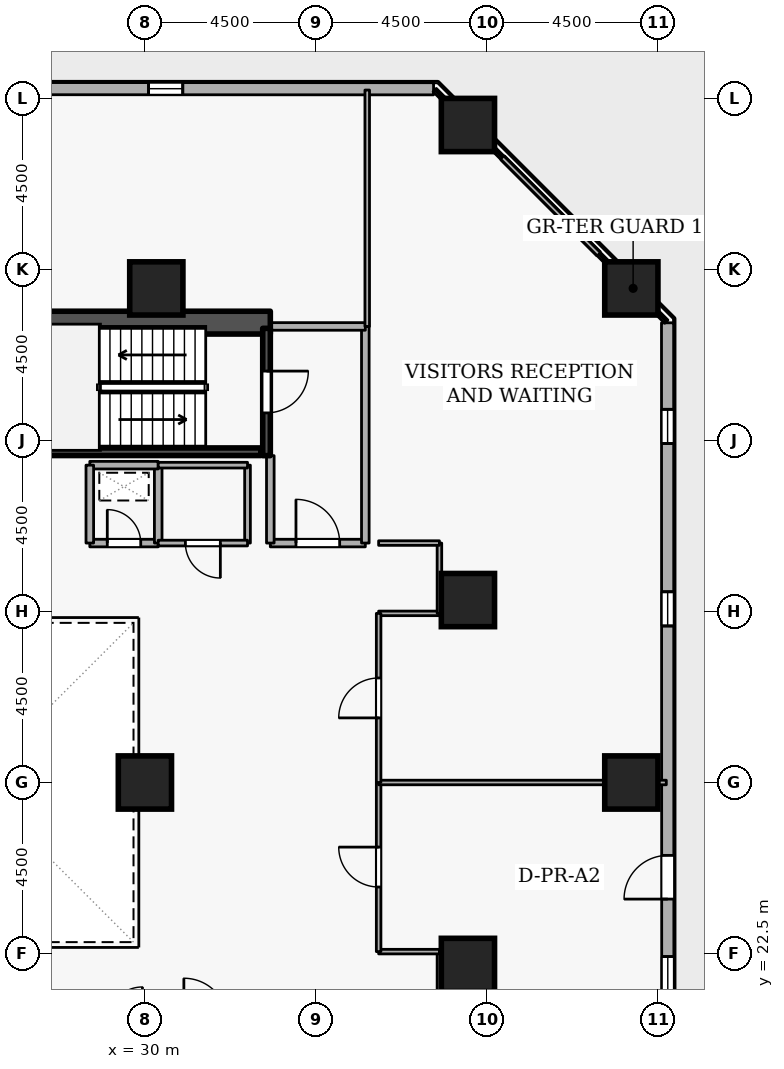
"""IFC4 building model, lengths in metres.
Left out: names, types, materials, properties, quantities, classifications, styles, units other than length and angle.
Written with IfcOpenShell. Run it as: python <this file> out.ifc"""

import sys

from ifc_helpers import new_model, si_unit, direction, frame, frame_2d, origin, origin_2d, place, context, subcontext, project, spatial, rectangle, extrude, element, fill, save


model = new_model("IFC4")
c1 = context("Model", 3, precision=1e-05, world=origin(), true_north=direction((0.0, 1.0)))
c2 = subcontext(c1, "Body", "Model", "MODEL_VIEW")
j1 = project(units=[si_unit("LENGTHUNIT", "METRE"), si_unit("PLANEANGLEUNIT", "RADIAN")], contexts=[c1])
p1 = place(None, origin())
s1 = spatial("IfcSite", under=j1, at=p1, CompositionType="ELEMENT")
p2 = place(p1, origin())
s2 = spatial("IfcBuilding", under=s1, at=p2, CompositionType="ELEMENT")
p3 = place(p2, frame((0.0, 0.0, 27.9)))
s3 = spatial("IfcBuildingStorey", under=s2, at=p3, CompositionType="ELEMENT", Elevation=27.9)
p4 = place(p3, frame((17.7, 39.1, 0.0), z_axis=(0.0, 0.0, 1.0), x_axis=(1.0, 0.0, 0.0)))
e1 = element("IfcWall", 1, at=p4, inside=s3, PredefinedType="SHEAR", context=c2, shape_type="SweptSolid", body=[
    extrude(rectangle(XDim=15.6, YDim=0.6, at=frame_2d((7.8, 0.0))), origin(), (0.0, 0.0, 1.0), 3.6),
])
for number, where, z_axis, x_axis in (
    (2, (42.8, 27.0, 0.0), (0.0, 0.0, 1.0), (1.0, 0.0, 0.0)),
    (3, (42.8, 40.0, 0.0), (0.0, 0.0, 1.0), (1.0, 0.0, 0.0)),
    (4, (38.5, 44.3, 0.0), (0.0, 0.0, 1.0), (1.0, 0.0, 0.0)),
    (5, (38.5, 22.2, 0.0), (0.0, 0.0, 1.0), (1.0, 0.0, 0.0)),
    (6, (38.5, 31.8, 0.0), (0.0, 0.0, 1.0), (1.0, 0.0, 0.0)),
    (7, (30.3, 40.0, 0.0), (0.0, 0.0, 1.0), (1.0, 0.0, 0.0)),
    (8, (30.0, 27.0, 0.0), (0.0, 0.0, 1.0), (1.0, 0.0, 0.0)),
):
    element("IfcColumn", number, at=place(p3, frame(where, z_axis=z_axis, x_axis=x_axis)), inside=s3, PredefinedType="COLUMN", context=c2, shape_type="SweptSolid", body=[
        extrude(rectangle(XDim=1.4, YDim=1.4, at=origin_2d()), origin(), (0.0, 0.0, 1.0), 3.6),
    ])
p5 = place(p3, frame((43.765, 5.319, 0.0), z_axis=(0.0, 0.0, 1.0), x_axis=(-0.000339718087, 0.999999942296, 0.0)))
e9 = element("IfcWall", 9, at=p5, inside=s3, PredefinedType="STANDARD", context=c2, shape_type="SweptSolid", body=[
    extrude(rectangle(XDim=33.777, YDim=0.32, at=frame_2d((16.888, 0.0))), origin(), (0.0, 0.0, 1.0), 2.7),
])
p6 = place(p5, frame((18.614, 0.0, 0.0)))
e10 = element("IfcOpeningElement", 10, at=p6, cuts=e9, PredefinedType="OPENING", context=c2, shape_type="SweptSolid", body=[
    extrude(rectangle(XDim=1.15, YDim=2.1, at=frame_2d((0.575, 1.05))), frame((0.0, 0.17, 0.0), z_axis=(0.0, -1.0, 0.0), x_axis=(1.0, 0.0, 0.0)), (0.0, 0.0, 1.0), 0.34),
])
p7 = place(p5, frame((1.8, 0.0, 0.72)))
e11 = element("IfcOpeningElement", 11, at=p7, cuts=e9, PredefinedType="OPENING", context=c2, shape_type="SweptSolid", body=[
    extrude(rectangle(XDim=0.9, YDim=1.75, at=frame_2d((0.45, 0.875))), frame((0.0, 0.17, 0.0), z_axis=(0.0, -1.0, 0.0), x_axis=(1.0, 0.0, 0.0)), (0.0, 0.0, 1.0), 0.34),
])
p8 = place(p5, frame((6.6, 0.0, 0.72)))
e12 = element("IfcOpeningElement", 12, at=p8, cuts=e9, PredefinedType="OPENING", context=c2, shape_type="SweptSolid", body=[
    extrude(rectangle(XDim=0.9, YDim=1.75, at=frame_2d((0.45, 0.875))), frame((0.0, 0.17, 0.0), z_axis=(0.0, -1.0, 0.0), x_axis=(1.0, 0.0, 0.0)), (0.0, 0.0, 1.0), 0.34),
])
p9 = place(p5, frame((11.4, 0.0, 0.72)))
e13 = element("IfcOpeningElement", 13, at=p9, cuts=e9, PredefinedType="OPENING", context=c2, shape_type="SweptSolid", body=[
    extrude(rectangle(XDim=0.9, YDim=1.75, at=frame_2d((0.45, 0.875))), frame((0.0, 0.17, 0.0), z_axis=(0.0, -1.0, 0.0), x_axis=(1.0, 0.0, 0.0)), (0.0, 0.0, 1.0), 0.34),
])
p10 = place(p5, frame((16.2, 0.0, 0.72)))
e14 = element("IfcOpeningElement", 14, at=p10, cuts=e9, PredefinedType="OPENING", context=c2, shape_type="SweptSolid", body=[
    extrude(rectangle(XDim=0.9, YDim=1.75, at=frame_2d((0.45, 0.875))), frame((0.0, 0.17, 0.0), z_axis=(0.0, -1.0, 0.0), x_axis=(1.0, 0.0, 0.0)), (0.0, 0.0, 1.0), 0.34),
])
p11 = place(p5, frame((25.8, 0.0, 0.72)))
e15 = element("IfcOpeningElement", 15, at=p11, cuts=e9, PredefinedType="OPENING", context=c2, shape_type="SweptSolid", body=[
    extrude(rectangle(XDim=0.9, YDim=1.75, at=frame_2d((0.45, 0.875))), frame((0.0, 0.17, 0.0), z_axis=(0.0, -1.0, 0.0), x_axis=(1.0, 0.0, 0.0)), (0.0, 0.0, 1.0), 0.34),
])
p12 = place(p5, frame((30.6, 0.0, 0.72)))
e16 = element("IfcOpeningElement", 16, at=p12, cuts=e9, PredefinedType="OPENING", context=c2, shape_type="SweptSolid", body=[
    extrude(rectangle(XDim=0.9, YDim=1.75, at=frame_2d((0.45, 0.875))), frame((0.0, 0.17, 0.0), z_axis=(0.0, -1.0, 0.0), x_axis=(1.0, 0.0, 0.0)), (0.0, 0.0, 1.0), 0.34),
])
p13 = place(p3, frame((37.596, 45.253, 0.0), z_axis=(0.0, 0.0, 1.0), x_axis=(-0.999999942296, 0.000339718087, 0.0)))
e17 = element("IfcWall", 17, at=p13, inside=s3, PredefinedType="STANDARD", context=c2, shape_type="SweptSolid", body=[
    extrude(rectangle(XDim=33.777, YDim=0.32, at=frame_2d((16.888, 0.0))), origin(), (0.0, 0.0, 1.0), 2.7),
])
p14 = place(p13, frame((27.164, 0.0, 0.0)))
e18 = element("IfcOpeningElement", 18, at=p14, cuts=e17, PredefinedType="OPENING", context=c2, shape_type="SweptSolid", body=[
    extrude(rectangle(XDim=1.15, YDim=2.1, at=frame_2d((0.575, 1.05))), frame((0.0, 0.17, 0.0), z_axis=(0.0, -1.0, 0.0), x_axis=(1.0, 0.0, 0.0)), (0.0, 0.0, 1.0), 0.34),
])
p15 = place(p13, frame((6.6, 0.0, 0.72)))
e19 = element("IfcOpeningElement", 19, at=p15, cuts=e17, PredefinedType="OPENING", context=c2, shape_type="SweptSolid", body=[
    extrude(rectangle(XDim=0.9, YDim=1.75, at=frame_2d((0.45, 0.875))), frame((0.0, 0.17, 0.0), z_axis=(0.0, -1.0, 0.0), x_axis=(1.0, 0.0, 0.0)), (0.0, 0.0, 1.0), 0.34),
])
p16 = place(p13, frame((16.2, 0.0, 0.72)))
e20 = element("IfcOpeningElement", 20, at=p16, cuts=e17, PredefinedType="OPENING", context=c2, shape_type="SweptSolid", body=[
    extrude(rectangle(XDim=0.9, YDim=1.75, at=frame_2d((0.45, 0.875))), frame((0.0, 0.17, 0.0), z_axis=(0.0, -1.0, 0.0), x_axis=(1.0, 0.0, 0.0)), (0.0, 0.0, 1.0), 0.34),
])
p17 = place(p13, frame((21.0, 0.0, 0.72)))
e21 = element("IfcOpeningElement", 21, at=p17, cuts=e17, PredefinedType="OPENING", context=c2, shape_type="SweptSolid", body=[
    extrude(rectangle(XDim=0.9, YDim=1.75, at=frame_2d((0.45, 0.875))), frame((0.0, 0.17, 0.0), z_axis=(0.0, -1.0, 0.0), x_axis=(1.0, 0.0, 0.0)), (0.0, 0.0, 1.0), 0.34),
])
p18 = place(p13, frame((30.6, 0.0, 0.72)))
e22 = element("IfcOpeningElement", 22, at=p18, cuts=e17, PredefinedType="OPENING", context=c2, shape_type="SweptSolid", body=[
    extrude(rectangle(XDim=0.9, YDim=1.75, at=frame_2d((0.45, 0.875))), frame((0.0, 0.17, 0.0), z_axis=(0.0, -1.0, 0.0), x_axis=(1.0, 0.0, 0.0)), (0.0, 0.0, 1.0), 0.34),
])
p19 = place(p3, frame((33.2, 38.95, 0.0), z_axis=(0.0, 0.0, 1.0), x_axis=(0.0, -1.0, 0.0)))
e23 = element("IfcWall", 23, at=p19, inside=s3, PredefinedType="SHEAR", context=c2, shape_type="SweptSolid", body=[
    extrude(rectangle(XDim=3.35, YDim=0.2, at=frame_2d((1.675, 0.0))), origin(), (0.0, 0.0, 1.0), 3.6),
])
p20 = place(p19, frame((1.125, 0.0, 0.0)))
e24 = element("IfcOpeningElement", 24, at=p20, cuts=e23, PredefinedType="OPENING", context=c2, shape_type="SweptSolid", body=[
    extrude(rectangle(XDim=1.1, YDim=2.1, at=frame_2d((0.55, 1.05))), frame((0.0, 0.11, 0.0), z_axis=(0.0, -1.0, 0.0), x_axis=(1.0, 0.0, 0.0)), (0.0, 0.0, 1.0), 0.22),
])
p21 = place(p3, frame((25.95, 35.703, 0.0), z_axis=(0.0, 0.0, 1.0), x_axis=(1.0, 0.0, 0.0)))
e25 = element("IfcWall", 25, at=p21, inside=s3, PredefinedType="SHEAR", context=c2, shape_type="SweptSolid", body=[
    extrude(rectangle(XDim=7.1, YDim=0.2, at=frame_2d((3.55, 0.0))), origin(), (0.0, 0.0, 1.0), 3.6),
])
p22 = place(p3, frame((33.3, 33.3, 0.0), z_axis=(0.0, 0.0, 1.0), x_axis=(1.0, 0.0, 0.0)))
e26 = element("IfcWall", 26, at=p22, inside=s3, PredefinedType="STANDARD", context=c2, shape_type="SweptSolid", body=[
    extrude(rectangle(XDim=2.5, YDim=0.2, at=frame_2d((1.25, 0.0))), origin(), (0.0, 0.0, 1.0), 3.34),
])
p23 = place(p22, frame((0.675, 0.0, 0.0)))
e27 = element("IfcOpeningElement", 27, at=p23, cuts=e26, PredefinedType="OPENING", context=c2, shape_type="SweptSolid", body=[
    extrude(rectangle(XDim=1.15, YDim=2.1, at=frame_2d((0.575, 1.05))), frame((0.0, 0.11, 0.0), z_axis=(0.0, -1.0, 0.0), x_axis=(1.0, 0.0, 0.0)), (0.0, 0.0, 1.0), 0.22),
])
p24 = place(p3, frame((35.8, 33.3, 0.0), z_axis=(0.0, 0.0, 1.0), x_axis=(0.0, 1.0, 0.0)))
e28 = element("IfcWall", 28, at=p24, inside=s3, PredefinedType="STANDARD", context=c2, shape_type="SweptSolid", body=[
    extrude(rectangle(XDim=5.7, YDim=0.2, at=frame_2d((2.85, 0.0))), origin(), (0.0, 0.0, 1.0), 3.34),
])
p25 = place(p3, frame((35.8, 39.0, 0.0), z_axis=(0.0, 0.0, 1.0), x_axis=(-1.0, 0.0, 0.0)))
e29 = element("IfcWall", 29, at=p25, inside=s3, PredefinedType="STANDARD", context=c2, shape_type="SweptSolid", body=[
    extrude(rectangle(XDim=2.5, YDim=0.2, at=frame_2d((1.25, 0.0))), origin(), (0.0, 0.0, 1.0), 3.34),
])
p26 = place(p3, frame((33.3, 35.6, 0.0), z_axis=(0.0, 0.0, 1.0), x_axis=(0.0, -1.0, 0.0)))
e30 = element("IfcWall", 30, at=p26, inside=s3, PredefinedType="STANDARD", context=c2, shape_type="SweptSolid", body=[
    extrude(rectangle(XDim=2.3, YDim=0.2, at=frame_2d((1.15, 0.0))), origin(), (0.0, 0.0, 1.0), 2.545),
])
p27 = place(p3, frame((28.55, 33.3, 0.0), z_axis=(0.0, 0.0, 1.0), x_axis=(1.0, 0.0, 0.0)))
e31 = element("IfcWall", 31, at=p27, inside=s3, PredefinedType="STANDARD", context=c2, shape_type="SweptSolid", body=[
    extrude(rectangle(XDim=1.8, YDim=0.2, at=frame_2d((0.9, 0.0))), origin(), (0.0, 0.0, 1.0), 3.34),
])
p28 = place(p27, frame((0.46, 0.0, 0.0)))
e32 = element("IfcOpeningElement", 32, at=p28, cuts=e31, PredefinedType="OPENING", context=c2, shape_type="SweptSolid", body=[
    extrude(rectangle(XDim=0.88, YDim=2.04, at=frame_2d((0.44, 1.02))), frame((0.0, 0.11, 0.0), z_axis=(0.0, -1.0, 0.0), x_axis=(1.0, 0.0, 0.0)), (0.0, 0.0, 1.0), 0.22),
])
p29 = place(p3, frame((30.35, 33.3, 0.0), z_axis=(0.0, 0.0, 1.0), x_axis=(0.0, 1.0, 0.0)))
e33 = element("IfcWall", 33, at=p29, inside=s3, PredefinedType="STANDARD", context=c2, shape_type="SweptSolid", body=[
    extrude(rectangle(XDim=2.05, YDim=0.2, at=frame_2d((1.025, 0.0))), origin(), (0.0, 0.0, 1.0), 3.34),
])
p30 = place(p3, frame((30.35, 35.35, 0.0), z_axis=(0.0, 0.0, 1.0), x_axis=(-1.0, 0.0, 0.0)))
e34 = element("IfcWall", 34, at=p30, inside=s3, PredefinedType="STANDARD", context=c2, shape_type="SweptSolid", body=[
    extrude(rectangle(XDim=1.8, YDim=0.2, at=frame_2d((0.9, 0.0))), origin(), (0.0, 0.0, 1.0), 3.34),
])
p31 = place(p3, frame((28.55, 35.35, 0.0), z_axis=(0.0, 0.0, 1.0), x_axis=(0.0, -1.0, 0.0)))
e35 = element("IfcWall", 35, at=p31, inside=s3, PredefinedType="STANDARD", context=c2, shape_type="SweptSolid", body=[
    extrude(rectangle(XDim=2.05, YDim=0.2, at=frame_2d((1.025, 0.0))), origin(), (0.0, 0.0, 1.0), 3.34),
])
p32 = place(p3, frame((32.7, 35.35, 0.0), z_axis=(0.0, 0.0, 1.0), x_axis=(0.0, -1.0, 0.0)))
e36 = element("IfcWall", 36, at=p32, inside=s3, PredefinedType="PARTITIONING", context=c2, shape_type="SweptSolid", body=[
    extrude(rectangle(XDim=2.05, YDim=0.15, at=frame_2d((1.025, 0.0))), origin(), (0.0, 0.0, 1.0), 2.545),
])
p33 = place(p3, frame((32.7, 33.3, 0.0), z_axis=(0.0, 0.0, 1.0), x_axis=(-1.0, 0.0, 0.0)))
e37 = element("IfcWall", 37, at=p33, inside=s3, PredefinedType="PARTITIONING", context=c2, shape_type="SweptSolid", body=[
    extrude(rectangle(XDim=2.35, YDim=0.15, at=frame_2d((1.175, 0.0))), origin(), (0.0, 0.0, 1.0), 3.34),
])
p34 = place(p33, frame((0.715, 0.0, 0.0)))
e38 = element("IfcOpeningElement", 38, at=p34, cuts=e37, PredefinedType="OPENING", context=c2, shape_type="SweptSolid", body=[
    extrude(rectangle(XDim=0.92, YDim=2.08, at=frame_2d((0.46, 1.04))), frame((0.0, 0.085, 0.0), z_axis=(0.0, -1.0, 0.0), x_axis=(1.0, 0.0, 0.0)), (0.0, 0.0, 1.0), 0.17),
])
p35 = place(p3, frame((30.35, 35.35, 0.0), z_axis=(0.0, 0.0, 1.0), x_axis=(1.0, 0.0, 0.0)))
e39 = element("IfcWall", 39, at=p35, inside=s3, PredefinedType="PARTITIONING", context=c2, shape_type="SweptSolid", body=[
    extrude(rectangle(XDim=2.35, YDim=0.15, at=frame_2d((1.175, 0.0))), origin(), (0.0, 0.0, 1.0), 3.34),
])
p36 = place(p3, frame((37.75, 20.7, 0.0), z_axis=(0.0, 0.0, 1.0), x_axis=(0.0, 1.0, 0.0)))
e40 = element("IfcWall", 40, at=p36, inside=s3, PredefinedType="PARTITIONING", context=c2, shape_type="SweptSolid", body=[
    extrude(rectangle(XDim=1.85, YDim=0.12, at=frame_2d((0.925, 0.0))), origin(), (0.0, 0.0, 1.0), 3.34),
])
p37 = place(p3, frame((37.75, 22.55, 0.0), z_axis=(0.0, 0.0, 1.0), x_axis=(-1.0, 0.0, 0.0)))
e41 = element("IfcWall", 41, at=p37, inside=s3, PredefinedType="PARTITIONING", context=c2, shape_type="SweptSolid", body=[
    extrude(rectangle(XDim=1.6, YDim=0.12, at=frame_2d((0.8, 0.0))), origin(), (0.0, 0.0, 1.0), 3.34),
])
p38 = place(p3, frame((36.15, 22.55, 0.0), z_axis=(0.0, 0.0, 1.0), x_axis=(0.0, 1.0, 0.0)))
e42 = element("IfcWall", 42, at=p38, inside=s3, PredefinedType="PARTITIONING", context=c2, shape_type="SweptSolid", body=[
    extrude(rectangle(XDim=4.45, YDim=0.12, at=frame_2d((2.225, 0.0))), origin(), (0.0, 0.0, 1.0), 3.34),
])
p39 = place(p38, frame((1.7, 0.0, 0.0)))
e43 = element("IfcOpeningElement", 43, at=p39, cuts=e42, PredefinedType="OPENING", context=c2, shape_type="SweptSolid", body=[
    extrude(rectangle(XDim=1.05, YDim=2.1, at=frame_2d((0.525, 1.05))), frame((0.0, 0.07, 0.0), z_axis=(0.0, -1.0, 0.0), x_axis=(1.0, 0.0, 0.0)), (0.0, 0.0, 1.0), 0.14),
])
p40 = place(p3, frame((36.15, 27.0, 0.0), z_axis=(0.0, 0.0, 1.0), x_axis=(1.0, 0.0, 0.0)))
e44 = element("IfcWall", 44, at=p40, inside=s3, PredefinedType="PARTITIONING", context=c2, shape_type="SweptSolid", body=[
    extrude(rectangle(XDim=7.57, YDim=0.12, at=frame_2d((3.785, 0.0))), origin(), (0.0, 0.0, 1.0), 2.878),
])
p41 = place(p3, frame((36.15, 31.45, 0.0), z_axis=(0.0, 0.0, 1.0), x_axis=(1.0, 0.0, 0.0)))
e45 = element("IfcWall", 45, at=p41, inside=s3, PredefinedType="PARTITIONING", context=c2, shape_type="SweptSolid", body=[
    extrude(rectangle(XDim=1.6, YDim=0.12, at=frame_2d((0.8, 0.0))), origin(), (0.0, 0.0, 1.0), 3.34),
])
p42 = place(p3, frame((37.75, 31.45, 0.0), z_axis=(0.0, 0.0, 1.0), x_axis=(0.0, 1.0, 0.0)))
e46 = element("IfcWall", 46, at=p42, inside=s3, PredefinedType="PARTITIONING", context=c2, shape_type="SweptSolid", body=[
    extrude(rectangle(XDim=1.85, YDim=0.12, at=frame_2d((0.925, 0.0))), origin(), (0.0, 0.0, 1.0), 3.34),
])
p43 = place(p3, frame((37.75, 33.3, 0.0), z_axis=(0.0, 0.0, 1.0), x_axis=(-1.0, 0.0, 0.0)))
e47 = element("IfcWall", 47, at=p43, inside=s3, PredefinedType="PARTITIONING", context=c2, shape_type="SweptSolid", body=[
    extrude(rectangle(XDim=1.6, YDim=0.12, at=frame_2d((0.8, 0.0))), origin(), (0.0, 0.0, 1.0), 3.34),
])
p44 = place(p3, frame((35.85, 39.0, 0.0), z_axis=(0.0, 0.0, 1.0), x_axis=(0.0, 1.0, 0.0)))
e48 = element("IfcWall", 48, at=p44, inside=s3, PredefinedType="PARTITIONING", context=c2, shape_type="SweptSolid", body=[
    extrude(rectangle(XDim=6.22, YDim=0.12, at=frame_2d((3.11, 0.0))), origin(), (0.0, 0.0, 1.0), 3.34),
])
p45 = place(p3, frame((37.625, 45.22, 0.0), z_axis=(0.0, 0.0, 1.0), x_axis=(0.707106781187, -0.707106781187, 0.0)))
e49 = element("IfcWall", 49, at=p45, inside=s3, PredefinedType="PARTITIONING", context=c2, shape_type="SweptSolid", body=[
    extrude(rectangle(XDim=8.619, YDim=0.12, at=frame_2d((4.31, 0.0))), origin(), (0.0, 0.0, 1.0), 3.34),
])
p46 = place(p3, frame((36.15, 27.0, 0.0), z_axis=(0.0, 0.0, 1.0), x_axis=(0.0, 1.0, 0.0)))
e50 = element("IfcWall", 50, at=p46, inside=s3, PredefinedType="PARTITIONING", context=c2, shape_type="SweptSolid", body=[
    extrude(rectangle(XDim=4.45, YDim=0.12, at=frame_2d((2.225, 0.0))), origin(), (0.0, 0.0, 1.0), 3.34),
])
p47 = place(p46, frame((1.7, 0.0, 0.0)))
e51 = element("IfcOpeningElement", 51, at=p47, cuts=e50, PredefinedType="OPENING", context=c2, shape_type="SweptSolid", body=[
    extrude(rectangle(XDim=1.05, YDim=2.1, at=frame_2d((0.525, 1.05))), frame((0.0, 0.07, 0.0), z_axis=(0.0, -1.0, 0.0), x_axis=(1.0, 0.0, 0.0)), (0.0, 0.0, 1.0), 0.14),
])
p48 = place(p6, origin())
e52 = element("IfcDoor", 52, at=p48, inside=s3, OperationType="SINGLE_SWING_LEFT", PredefinedType="DOOR", context=c2, shape_type="SweptSolid", body=[
    extrude(rectangle(XDim=1.15, YDim=2.1, at=frame_2d((0.575, 1.05))), frame((0.0, 0.025, 0.0), z_axis=(0.0, -1.0, 0.0), x_axis=(1.0, 0.0, 0.0)), (0.0, 0.0, 1.0), 0.05),
])
fill(e10, e52)
p49 = place(p10, origin())
e53 = element("IfcWindow", 53, at=p49, inside=s3, PartitioningType="SINGLE_PANEL", PredefinedType="WINDOW", context=c2, shape_type="SweptSolid", body=[
    extrude(rectangle(XDim=0.9, YDim=1.75, at=frame_2d((0.45, 0.875))), frame((0.0, 0.03, 0.0), z_axis=(0.0, -1.0, 0.0), x_axis=(1.0, 0.0, 0.0)), (0.0, 0.0, 1.0), 0.06),
])
fill(e14, e53)
p50 = place(p11, origin())
e54 = element("IfcWindow", 54, at=p50, inside=s3, PartitioningType="SINGLE_PANEL", PredefinedType="WINDOW", context=c2, shape_type="SweptSolid", body=[
    extrude(rectangle(XDim=0.9, YDim=1.75, at=frame_2d((0.45, 0.875))), frame((0.0, 0.03, 0.0), z_axis=(0.0, -1.0, 0.0), x_axis=(1.0, 0.0, 0.0)), (0.0, 0.0, 1.0), 0.06),
])
fill(e15, e54)
p51 = place(p12, origin())
e55 = element("IfcWindow", 55, at=p51, inside=s3, PartitioningType="SINGLE_PANEL", PredefinedType="WINDOW", context=c2, shape_type="SweptSolid", body=[
    extrude(rectangle(XDim=0.9, YDim=1.75, at=frame_2d((0.45, 0.875))), frame((0.0, 0.03, 0.0), z_axis=(0.0, -1.0, 0.0), x_axis=(1.0, 0.0, 0.0)), (0.0, 0.0, 1.0), 0.06),
])
fill(e16, e55)
p52 = place(p15, origin())
e56 = element("IfcWindow", 56, at=p52, inside=s3, PartitioningType="SINGLE_PANEL", PredefinedType="WINDOW", context=c2, shape_type="SweptSolid", body=[
    extrude(rectangle(XDim=0.9, YDim=1.75, at=frame_2d((0.45, 0.875))), frame((0.0, 0.03, 0.0), z_axis=(0.0, -1.0, 0.0), x_axis=(1.0, 0.0, 0.0)), (0.0, 0.0, 1.0), 0.06),
])
fill(e19, e56)
p53 = place(p20, origin())
e57 = element("IfcDoor", 57, at=p53, inside=s3, OperationType="SINGLE_SWING_LEFT", PredefinedType="DOOR", context=c2, shape_type="SweptSolid", body=[
    extrude(rectangle(XDim=1.1, YDim=2.1, at=frame_2d((0.55, 1.05))), frame((0.0, 0.025, 0.0), z_axis=(0.0, -1.0, 0.0), x_axis=(1.0, 0.0, 0.0)), (0.0, 0.0, 1.0), 0.05),
])
fill(e24, e57)
p54 = place(p23, origin())
e58 = element("IfcDoor", 58, at=p54, inside=s3, OperationType="SINGLE_SWING_LEFT", PredefinedType="DOOR", context=c2, shape_type="SweptSolid", body=[
    extrude(rectangle(XDim=1.15, YDim=2.1, at=frame_2d((0.575, 1.05))), frame((0.0, 0.025, 0.0), z_axis=(0.0, -1.0, 0.0), x_axis=(1.0, 0.0, 0.0)), (0.0, 0.0, 1.0), 0.05),
])
fill(e27, e58)
p55 = place(p28, origin())
e59 = element("IfcDoor", 59, at=p55, inside=s3, OperationType="SINGLE_SWING_LEFT", PredefinedType="DOOR", context=c2, shape_type="SweptSolid", body=[
    extrude(rectangle(XDim=0.88, YDim=2.04, at=frame_2d((0.44, 1.02))), frame((0.0, 0.025, 0.0), z_axis=(0.0, -1.0, 0.0), x_axis=(1.0, 0.0, 0.0)), (0.0, 0.0, 1.0), 0.05),
])
fill(e32, e59)
p56 = place(p34, origin())
e60 = element("IfcDoor", 60, at=p56, inside=s3, OperationType="SINGLE_SWING_LEFT", PredefinedType="DOOR", context=c2, shape_type="SweptSolid", body=[
    extrude(rectangle(XDim=0.92, YDim=2.08, at=frame_2d((0.46, 1.04))), frame((0.0, 0.025, 0.0), z_axis=(0.0, -1.0, 0.0), x_axis=(1.0, 0.0, 0.0)), (0.0, 0.0, 1.0), 0.05),
])
fill(e38, e60)
p57 = place(p39, origin())
e61 = element("IfcDoor", 61, at=p57, inside=s3, OperationType="SINGLE_SWING_RIGHT", PredefinedType="DOOR", context=c2, shape_type="SweptSolid", body=[
    extrude(rectangle(XDim=1.05, YDim=2.1, at=frame_2d((0.525, 1.05))), frame((0.0, 0.025, 0.0), z_axis=(0.0, -1.0, 0.0), x_axis=(1.0, 0.0, 0.0)), (0.0, 0.0, 1.0), 0.05),
])
fill(e43, e61)
p58 = place(p47, origin())
e62 = element("IfcDoor", 62, at=p58, inside=s3, OperationType="SINGLE_SWING_LEFT", PredefinedType="DOOR", context=c2, shape_type="SweptSolid", body=[
    extrude(rectangle(XDim=1.05, YDim=2.1, at=frame_2d((0.525, 1.05))), frame((0.0, 0.025, 0.0), z_axis=(0.0, -1.0, 0.0), x_axis=(1.0, 0.0, 0.0)), (0.0, 0.0, 1.0), 0.05),
])
fill(e51, e62)
save(model, sys.argv[1])
